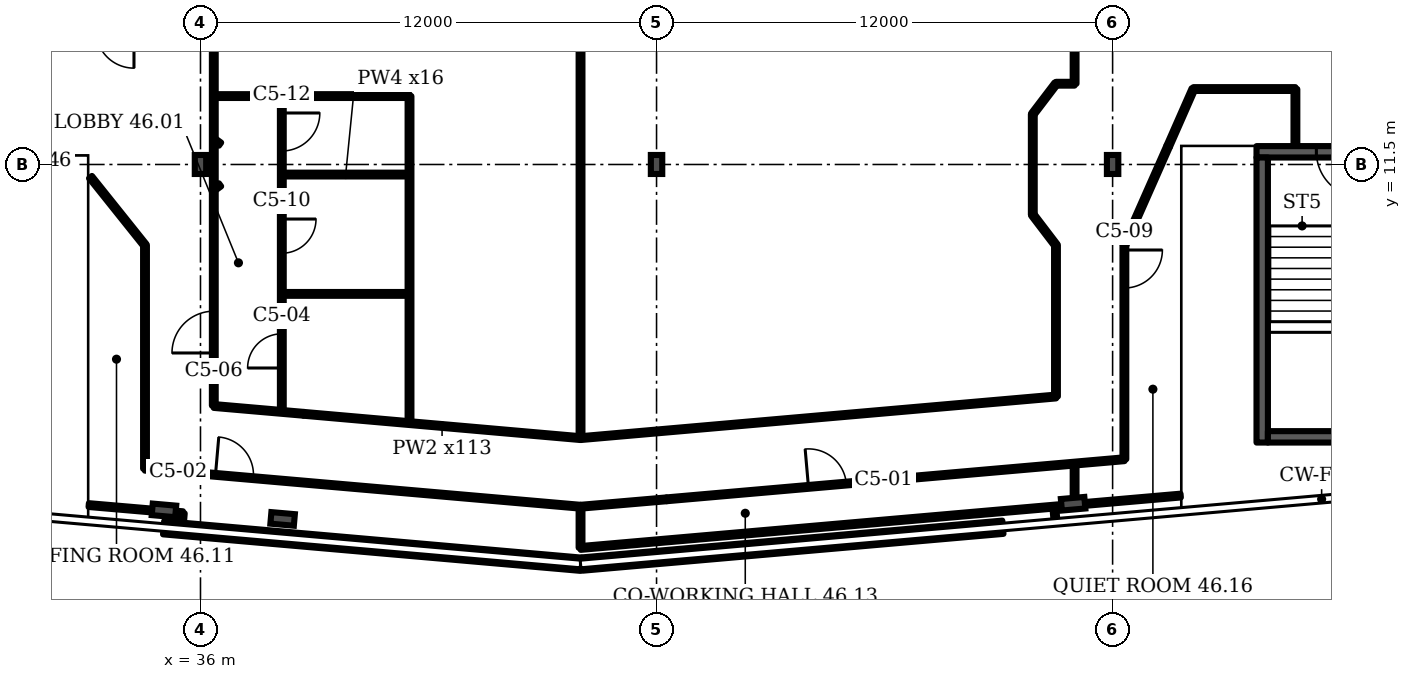
"""IFC4 building model, lengths in metres.
Left out: names, types, materials, properties, quantities, classifications, styles, units other than length and angle.
Written with IfcOpenShell. Run it as: python <this file> out.ifc"""

import sys

from ifc_helpers import new_model, si_unit, direction, frame, frame_2d, origin, origin_2d, place, context, subcontext, project, spatial, rectangle, i_section, extrude, element, fill, save


model = new_model("IFC4")
c1 = context("Model", 3, precision=1e-05, world=origin(), true_north=direction((0.0, 1.0)))
c2 = subcontext(c1, "Body", "Model", "MODEL_VIEW")
j1 = project(units=[si_unit("LENGTHUNIT", "METRE"), si_unit("PLANEANGLEUNIT", "RADIAN")], contexts=[c1])
p1 = place(None, origin())
s1 = spatial("IfcSite", under=j1, at=p1, CompositionType="ELEMENT")
p2 = place(p1, origin())
s2 = spatial("IfcBuilding", under=s1, at=p2, CompositionType="ELEMENT")
p3 = place(p2, frame((0.0, 0.0, 187.9)))
s3 = spatial("IfcBuildingStorey", under=s2, at=p3, CompositionType="ELEMENT", Elevation=187.9)
for number, where, z_axis, x_axis in (
    (1, (35.039, 2.399, 0.0), (0.0, 0.0, 1.0), (-0.087, -0.996, 0.0)),
    (2, (38.161, 2.174, 0.0), (0.0, 0.0, 1.0), (-0.087, -0.996, 0.0)),
    (3, (58.961, 2.573, 0.0), (0.0, 0.0, 1.0), (0.087, -0.996, 0.0)),
):
    element("IfcColumn", number, at=place(p3, frame(where, z_axis=z_axis, x_axis=x_axis)), inside=s3, PredefinedType="COLUMN", context=c2, shape_type="SweptSolid", body=[
        extrude(i_section(OverallWidth=0.305, OverallDepth=0.62, WebThickness=0.021, FlangeThickness=0.04, FilletRadius=0.027, at=origin_2d()), origin(), (0.0, 0.0, 1.0), 3.6),
    ])
for number, where, z_axis, x_axis in (
    (4, (36.0, 11.5, 0.0), (0.0, 0.0, 1.0), (1.0, 0.0, 0.0)),
    (5, (48.0, 11.5, 0.0), (0.0, 0.0, 1.0), (1.0, 0.0, 0.0)),
    (6, (60.0, 11.5, 0.0), (0.0, 0.0, 1.0), (1.0, 0.0, 0.0)),
):
    element("IfcColumn", number, at=place(p3, frame(where, z_axis=z_axis, x_axis=x_axis)), inside=s3, PredefinedType="COLUMN", context=c2, shape_type="SweptSolid", body=[
        extrude(i_section(OverallWidth=0.3, OverallDepth=0.5, WebThickness=0.014, FlangeThickness=0.028, FilletRadius=0.027, at=origin_2d()), origin(), (0.0, 0.0, 1.0), 3.6),
    ])
p4 = place(p3, frame((35.03, 1.943, 0.0), z_axis=(0.0, 0.0, 1.0), x_axis=(0.996199, -0.08714, 0.0)))
e7 = element("IfcWall", 7, at=p4, inside=s3, PredefinedType="SOLIDWALL", context=c2, shape_type="SweptSolid", body=[
    extrude(rectangle(XDim=11.028, YDim=0.35, at=frame_2d((5.514, 0.0))), origin(), (0.0, 0.0, 1.0), 1.0),
])
p5 = place(p3, frame((46.045, 0.987, 0.0), z_axis=(0.0, 0.0, 1.0), x_axis=(0.996193, 0.087171, 0.0)))
e8 = element("IfcWall", 8, at=p5, inside=s3, PredefinedType="SOLIDWALL", context=c2, shape_type="SweptSolid", body=[
    extrude(rectangle(XDim=11.11, YDim=0.35, at=frame_2d((5.555, 0.0))), origin(), (0.0, 0.0, 1.0), 1.0),
])
p6 = place(p3, frame((63.786, 11.834, 0.0), z_axis=(0.0, 0.0, 1.0), x_axis=(1.0, 0.0, 0.0)))
e9 = element("IfcWall", 9, at=p6, inside=s3, PredefinedType="SHEAR", context=c2, shape_type="SweptSolid", body=[
    extrude(rectangle(XDim=4.35, YDim=0.3, at=frame_2d((2.175, 0.0))), origin(), (0.0, 0.0, 1.0), 3.2),
])
p7 = place(p6, frame((1.575, 0.0, 0.0)))
e10 = element("IfcOpeningElement", 10, at=p7, cuts=e9, PredefinedType="OPENING", context=c2, shape_type="SweptSolid", body=[
    extrude(rectangle(XDim=1.2, YDim=2.1, at=frame_2d((0.6, 1.05))), frame((0.0, 0.16, 0.0), z_axis=(0.0, -1.0, 0.0), x_axis=(1.0, 0.0, 0.0)), (0.0, 0.0, 1.0), 0.32),
])
p8 = place(p3, frame((34.54, 3.495, 0.0), z_axis=(0.0, 0.0, 1.0), x_axis=(0.0, 1.0, 0.0)))
e11 = element("IfcWall", 11, at=p8, inside=s3, PredefinedType="PARTITIONING", context=c2, shape_type="SweptSolid", body=[
    extrude(rectangle(XDim=5.88, YDim=0.1, at=frame_2d((2.94, 0.0))), origin(), (0.0, 0.0, 1.0), 3.2),
])
p9 = place(p3, frame((34.54, 9.375, 0.0), z_axis=(0.0, 0.0, 1.0), x_axis=(-0.624735, 0.780839, 0.0)))
e12 = element("IfcWall", 12, at=p9, inside=s3, PredefinedType="PARTITIONING", context=c2, shape_type="SweptSolid", body=[
    extrude(rectangle(XDim=2.296, YDim=0.1, at=frame_2d((1.148, 0.0))), origin(), (0.0, 0.0, 1.0), 3.2),
])
p10 = place(p3, frame((35.502, 1.927, 0.0), z_axis=(0.0, 0.0, 1.0), x_axis=(0.083045, 0.996542, 0.0)))
e13 = element("IfcWall", 13, at=p10, inside=s3, PredefinedType="PARTITIONING", context=c2, shape_type="SweptSolid", body=[
    extrude(rectangle(XDim=0.4, YDim=0.1, at=frame_2d((0.2, 0.0))), origin(), (0.0, 0.0, 1.0), 3.2),
])
p11 = place(p3, frame((35.535, 2.325, 0.0), z_axis=(0.0, 0.0, 1.0), x_axis=(-0.996311, 0.085867, 0.0)))
e14 = element("IfcWall", 14, at=p11, inside=s3, PredefinedType="PARTITIONING", context=c2, shape_type="SweptSolid", body=[
    extrude(rectangle(XDim=2.485, YDim=0.1, at=frame_2d((1.243, 0.0))), origin(), (0.0, 0.0, 1.0), 2.58),
])
p12 = place(p3, frame((36.35, 5.155, 0.0), z_axis=(0.0, 0.0, 1.0), x_axis=(0.0, 1.0, 0.0)))
e15 = element("IfcWall", 15, at=p12, inside=s3, PredefinedType="PARTITIONING", context=c2, shape_type="SweptSolid", body=[
    extrude(rectangle(XDim=9.88, YDim=0.1, at=frame_2d((4.94, 0.0))), origin(), (0.0, 0.0, 1.0), 3.2),
])
p13 = place(p12, frame((1.385, 0.0, 0.0)))
e16 = element("IfcOpeningElement", 16, at=p13, cuts=e15, PredefinedType="OPENING", context=c2, shape_type="SweptSolid", body=[
    extrude(rectangle(XDim=1.1, YDim=2.1, at=frame_2d((0.55, 1.05))), frame((0.0, 0.06, 0.0), z_axis=(0.0, -1.0, 0.0), x_axis=(1.0, 0.0, 0.0)), (0.0, 0.0, 1.0), 0.12),
])
p14 = place(p3, frame((36.35, 10.845, 0.0), z_axis=(0.0, 0.0, 1.0), x_axis=(0.808115, 0.589026, 0.0)))
e17 = element("IfcWall", 17, at=p14, inside=s3, PredefinedType="PARTITIONING", context=c2, shape_type="SweptSolid", body=[
    extrude(rectangle(XDim=0.204, YDim=0.1, at=frame_2d((0.102, 0.0))), origin(), (0.0, 0.0, 1.0), 3.2),
])
p15 = place(p3, frame((36.35, 13.3, 0.0), z_axis=(0.0, 0.0, 1.0), x_axis=(1.0, 0.0, 0.0)))
e18 = element("IfcWall", 18, at=p15, inside=s3, PredefinedType="PARTITIONING", context=c2, shape_type="SweptSolid", body=[
    extrude(rectangle(XDim=5.15, YDim=0.1, at=frame_2d((2.575, 0.0))), origin(), (0.0, 0.0, 1.0), 3.2),
])
p16 = place(p3, frame((36.515, 12.035, 0.0), z_axis=(0.0, 0.0, 1.0), x_axis=(-0.808115, 0.589026, 0.0)))
e19 = element("IfcWall", 19, at=p16, inside=s3, PredefinedType="PARTITIONING", context=c2, shape_type="SweptSolid", body=[
    extrude(rectangle(XDim=0.204, YDim=0.1, at=frame_2d((0.102, 0.0))), origin(), (0.0, 0.0, 1.0), 3.2),
])
p17 = place(p3, frame((38.14, 5.0, 0.0), z_axis=(0.0, 0.0, 1.0), x_axis=(0.0, 1.0, 0.0)))
e20 = element("IfcWall", 20, at=p17, inside=s3, PredefinedType="PARTITIONING", context=c2, shape_type="SweptSolid", body=[
    extrude(rectangle(XDim=8.3, YDim=0.1, at=frame_2d((4.15, 0.0))), origin(), (0.0, 0.0, 1.0), 3.2),
])
p18 = place(p17, frame((1.145, 0.0, 0.0)))
e21 = element("IfcOpeningElement", 21, at=p18, cuts=e20, PredefinedType="OPENING", context=c2, shape_type="SweptSolid", body=[
    extrude(rectangle(XDim=0.9, YDim=2.1, at=frame_2d((0.45, 1.05))), frame((0.0, 0.06, 0.0), z_axis=(0.0, -1.0, 0.0), x_axis=(1.0, 0.0, 0.0)), (0.0, 0.0, 1.0), 0.12),
])
p19 = place(p17, frame((4.165, 0.0, 0.0)))
e22 = element("IfcOpeningElement", 22, at=p19, cuts=e20, PredefinedType="OPENING", context=c2, shape_type="SweptSolid", body=[
    extrude(rectangle(XDim=0.9, YDim=2.1, at=frame_2d((0.45, 1.05))), frame((0.0, 0.06, 0.0), z_axis=(0.0, -1.0, 0.0), x_axis=(1.0, 0.0, 0.0)), (0.0, 0.0, 1.0), 0.12),
])
p20 = place(p17, frame((6.855, 0.0, 0.0)))
e23 = element("IfcOpeningElement", 23, at=p20, cuts=e20, PredefinedType="OPENING", context=c2, shape_type="SweptSolid", body=[
    extrude(rectangle(XDim=1.0, YDim=2.1, at=frame_2d((0.5, 1.05))), frame((0.0, 0.06, 0.0), z_axis=(0.0, -1.0, 0.0), x_axis=(1.0, 0.0, 0.0)), (0.0, 0.0, 1.0), 0.12),
])
for number, where, z_axis, x_axis in (
    (24, (38.14, 8.095, 0.0), (0.0, 0.0, 1.0), (1.0, 0.0, 0.0)),
    (25, (38.14, 11.235, 0.0), (0.0, 0.0, 1.0), (1.0, 0.0, 0.0)),
):
    element("IfcWall", number, at=place(p3, frame(where, z_axis=z_axis, x_axis=x_axis)), inside=s3, PredefinedType="PARTITIONING", context=c2, shape_type="SweptSolid", body=[
        extrude(rectangle(XDim=3.36, YDim=0.1, at=frame_2d((1.68, 0.0))), origin(), (0.0, 0.0, 1.0), 3.2),
    ])
p21 = place(p3, frame((38.715, 4.94, 0.0), z_axis=(0.0, 0.0, 1.0), x_axis=(-0.996236, 0.086674, 0.0)))
e26 = element("IfcWall", 26, at=p21, inside=s3, PredefinedType="PARTITIONING", context=c2, shape_type="SweptSolid", body=[
    extrude(rectangle(XDim=2.372, YDim=0.1, at=frame_2d((1.186, 0.0))), origin(), (0.0, 0.0, 1.0), 3.2),
])
p22 = place(p3, frame((41.5, 4.695, 0.0), z_axis=(0.0, 0.0, 1.0), x_axis=(0.0, 1.0, 0.0)))
e27 = element("IfcWall", 27, at=p22, inside=s3, PredefinedType="PARTITIONING", context=c2, shape_type="SweptSolid", body=[
    extrude(rectangle(XDim=8.605, YDim=0.1, at=frame_2d((4.302, 0.0))), origin(), (0.0, 0.0, 1.0), 3.2),
])
p23 = place(p3, frame((46.0, 4.3, 0.0), z_axis=(0.0, 0.0, 1.0), x_axis=(-0.996173, 0.087448, 0.0)))
e28 = element("IfcWall", 28, at=p23, inside=s3, PredefinedType="PARTITIONING", context=c2, shape_type="SweptSolid", body=[
    extrude(rectangle(XDim=7.315, YDim=0.1, at=frame_2d((3.657, 0.0))), origin(), (0.0, 0.0, 1.0), 3.2),
])
p24 = place(p3, frame((46.0, 1.41, 0.0), z_axis=(0.0, 0.0, 1.0), x_axis=(0.996213, 0.086958, 0.0)))
e29 = element("IfcWall", 29, at=p24, inside=s3, PredefinedType="PARTITIONING", context=c2, shape_type="SweptSolid", body=[
    extrude(rectangle(XDim=15.852, YDim=0.1, at=frame_2d((7.926, 0.0))), origin(), (0.0, 0.0, 1.0), 2.58),
])
p25 = place(p3, frame((46.0, 1.415, 0.0), z_axis=(0.0, 0.0, 1.0), x_axis=(0.0, 1.0, 0.0)))
e30 = element("IfcWall", 30, at=p25, inside=s3, PredefinedType="PARTITIONING", context=c2, shape_type="SweptSolid", body=[
    extrude(rectangle(XDim=1.08, YDim=0.1, at=frame_2d((0.54, 0.0))), origin(), (0.0, 0.0, 1.0), 3.2),
])
p26 = place(p3, frame((46.0, 2.495, 0.0), z_axis=(0.0, 0.0, 1.0), x_axis=(-0.996214, 0.08693, 0.0)))
e31 = element("IfcWall", 31, at=p26, inside=s3, PredefinedType="PARTITIONING", context=c2, shape_type="SweptSolid", body=[
    extrude(rectangle(XDim=11.503, YDim=0.1, at=frame_2d((5.752, 0.0))), origin(), (0.0, 0.0, 1.0), 3.2),
])
p27 = place(p26, frame((8.642, 0.0, 0.0)))
e32 = element("IfcOpeningElement", 32, at=p27, cuts=e31, PredefinedType="OPENING", context=c2, shape_type="SweptSolid", body=[
    extrude(rectangle(XDim=1.0, YDim=2.1, at=frame_2d((0.5, 1.05))), frame((0.0, 0.06, 0.0), z_axis=(0.0, -1.0, 0.0), x_axis=(1.0, 0.0, 0.0)), (0.0, 0.0, 1.0), 0.12),
])
p28 = place(p3, frame((46.0, 4.3, 0.0), z_axis=(0.0, 0.0, 1.0), x_axis=(0.0, 1.0, 0.0)))
e33 = element("IfcWall", 33, at=p28, inside=s3, PredefinedType="PARTITIONING", context=c2, shape_type="SweptSolid", body=[
    extrude(rectangle(XDim=22.9, YDim=0.1, at=frame_2d((11.45, 0.0))), origin(), (0.0, 0.0, 1.0), 3.2),
])
p29 = place(p3, frame((46.0, 2.495, 0.0), z_axis=(0.0, 0.0, 1.0), x_axis=(0.996324, 0.085703, 0.0)))
e34 = element("IfcWall", 34, at=p29, inside=s3, PredefinedType="PARTITIONING", context=c2, shape_type="SweptSolid", body=[
    extrude(rectangle(XDim=2.273, YDim=0.1, at=frame_2d((1.137, 0.0))), origin(), (0.0, 0.0, 1.0), 3.2),
])
p30 = place(p3, frame((46.0, 4.3, 0.0), z_axis=(0.0, 0.0, 1.0), x_axis=(0.996189, 0.087194, 0.0)))
e35 = element("IfcWall", 35, at=p30, inside=s3, PredefinedType="PARTITIONING", context=c2, shape_type="SweptSolid", body=[
    extrude(rectangle(XDim=12.558, YDim=0.1, at=frame_2d((6.279, 0.0))), origin(), (0.0, 0.0, 1.0), 3.2),
])
p31 = place(p3, frame((48.265, 2.69, 0.0), z_axis=(0.0, 0.0, 1.0), x_axis=(0.996187, 0.087229, 0.0)))
e36 = element("IfcWall", 36, at=p31, inside=s3, PredefinedType="PARTITIONING", context=c2, shape_type="SweptSolid", body=[
    extrude(rectangle(XDim=12.091, YDim=0.1, at=frame_2d((6.045, 0.0))), origin(), (0.0, 0.0, 1.0), 3.2),
])
p32 = place(p31, frame((3.747, 0.0, 0.0)))
e37 = element("IfcOpeningElement", 37, at=p32, cuts=e36, PredefinedType="OPENING", context=c2, shape_type="SweptSolid", body=[
    extrude(rectangle(XDim=1.0, YDim=2.1, at=frame_2d((0.5, 1.05))), frame((0.0, 0.06, 0.0), z_axis=(0.0, -1.0, 0.0), x_axis=(1.0, 0.0, 0.0)), (0.0, 0.0, 1.0), 0.12),
])
p33 = place(p3, frame((57.9, 10.175, 0.0), z_axis=(0.0, 0.0, 1.0), x_axis=(0.0, 1.0, 0.0)))
e38 = element("IfcWall", 38, at=p33, inside=s3, PredefinedType="PARTITIONING", context=c2, shape_type="SweptSolid", body=[
    extrude(rectangle(XDim=2.65, YDim=0.1, at=frame_2d((1.325, 0.0))), origin(), (0.0, 0.0, 1.0), 3.2),
])
p34 = place(p3, frame((57.9, 12.825, 0.0), z_axis=(0.0, 0.0, 1.0), x_axis=(0.60639, 0.795174, 0.0)))
e39 = element("IfcWall", 39, at=p34, inside=s3, PredefinedType="PARTITIONING", context=c2, shape_type="SweptSolid", body=[
    extrude(rectangle(XDim=1.006, YDim=0.1, at=frame_2d((0.503, 0.0))), origin(), (0.0, 0.0, 1.0), 3.2),
])
p35 = place(p3, frame((58.498, 2.102, 0.0), z_axis=(0.0, 0.0, 1.0), x_axis=(-0.083045, 0.996542, 0.0)))
e40 = element("IfcWall", 40, at=p35, inside=s3, PredefinedType="PARTITIONING", context=c2, shape_type="SweptSolid", body=[
    extrude(rectangle(XDim=0.4, YDim=0.1, at=frame_2d((0.2, 0.0))), origin(), (0.0, 0.0, 1.0), 3.2),
])
p36 = place(p3, frame((58.51, 9.375, 0.0), z_axis=(0.0, 0.0, 1.0), x_axis=(-0.60639, 0.795174, 0.0)))
e41 = element("IfcWall", 41, at=p36, inside=s3, PredefinedType="PARTITIONING", context=c2, shape_type="SweptSolid", body=[
    extrude(rectangle(XDim=1.006, YDim=0.1, at=frame_2d((0.503, 0.0))), origin(), (0.0, 0.0, 1.0), 3.2),
])
p37 = place(p3, frame((58.51, 5.395, 0.0), z_axis=(0.0, 0.0, 1.0), x_axis=(0.0, 1.0, 0.0)))
e42 = element("IfcWall", 42, at=p37, inside=s3, PredefinedType="PARTITIONING", context=c2, shape_type="SweptSolid", body=[
    extrude(rectangle(XDim=3.98, YDim=0.1, at=frame_2d((1.99, 0.0))), origin(), (0.0, 0.0, 1.0), 3.2),
])
p38 = place(p3, frame((58.51, 13.625, 0.0), z_axis=(0.0, 0.0, 1.0), x_axis=(1.0, 0.0, 0.0)))
e43 = element("IfcWall", 43, at=p38, inside=s3, PredefinedType="PARTITIONING", context=c2, shape_type="SweptSolid", body=[
    extrude(rectangle(XDim=0.49, YDim=0.1, at=frame_2d((0.245, 0.0))), origin(), (0.0, 0.0, 1.0), 3.2),
])
p39 = place(p3, frame((59.0, 2.545, 0.0), z_axis=(0.0, 0.0, 1.0), x_axis=(0.0, 1.0, 0.0)))
e44 = element("IfcWall", 44, at=p39, inside=s3, PredefinedType="PARTITIONING", context=c2, shape_type="SweptSolid", body=[
    extrude(rectangle(XDim=1.085, YDim=0.1, at=frame_2d((0.542, 0.0))), origin(), (0.0, 0.0, 1.0), 3.2),
])
p40 = place(p3, frame((59.0, 13.625, 0.0), z_axis=(0.0, 0.0, 1.0), x_axis=(0.0, 1.0, 0.0)))
e45 = element("IfcWall", 45, at=p40, inside=s3, PredefinedType="PARTITIONING", context=c2, shape_type="SweptSolid", body=[
    extrude(rectangle(XDim=13.575, YDim=0.1, at=frame_2d((6.788, 0.0))), origin(), (0.0, 0.0, 1.0), 3.2),
])
p41 = place(p3, frame((60.31, 3.745, 0.0), z_axis=(0.0, 0.0, 1.0), x_axis=(0.0, 1.0, 0.0)))
e46 = element("IfcWall", 46, at=p41, inside=s3, PredefinedType="PARTITIONING", context=c2, shape_type="SweptSolid", body=[
    extrude(rectangle(XDim=5.63, YDim=0.1, at=frame_2d((2.815, 0.0))), origin(), (0.0, 0.0, 1.0), 3.2),
])
p42 = place(p41, frame((4.505, 0.0, 0.0)))
e47 = element("IfcOpeningElement", 47, at=p42, cuts=e46, PredefinedType="OPENING", context=c2, shape_type="SweptSolid", body=[
    extrude(rectangle(XDim=1.0, YDim=2.1, at=frame_2d((0.5, 1.05))), frame((0.0, 0.06, 0.0), z_axis=(0.0, -1.0, 0.0), x_axis=(1.0, 0.0, 0.0)), (0.0, 0.0, 1.0), 0.12),
])
p43 = place(p3, frame((60.31, 9.375, 0.0), z_axis=(0.0, 0.0, 1.0), x_axis=(0.404668, 0.914459, 0.0)))
e48 = element("IfcWall", 48, at=p43, inside=s3, PredefinedType="PARTITIONING", context=c2, shape_type="SweptSolid", body=[
    extrude(rectangle(XDim=2.854, YDim=0.1, at=frame_2d((1.427, 0.0))), origin(), (0.0, 0.0, 1.0), 3.2),
])
p44 = place(p3, frame((61.465, 11.985, 0.0), z_axis=(0.0, 0.0, 1.0), x_axis=(0.402692, 0.915331, 0.0)))
e49 = element("IfcWall", 49, at=p44, inside=s3, PredefinedType="PARTITIONING", context=c2, shape_type="SweptSolid", body=[
    extrude(rectangle(XDim=1.639, YDim=0.1, at=frame_2d((0.819, 0.0))), origin(), (0.0, 0.0, 1.0), 3.2),
])
p45 = place(p3, frame((62.125, 13.485, 0.0), z_axis=(0.0, 0.0, 1.0), x_axis=(1.0, 0.0, 0.0)))
e50 = element("IfcWall", 50, at=p45, inside=s3, PredefinedType="PARTITIONING", context=c2, shape_type="SweptSolid", body=[
    extrude(rectangle(XDim=2.685, YDim=0.1, at=frame_2d((1.343, 0.0))), origin(), (0.0, 0.0, 1.0), 3.2),
])
p46 = place(p3, frame((64.81, 12.004, 0.0), z_axis=(0.0, 0.0, 1.0), x_axis=(0.0, 1.0, 0.0)))
e51 = element("IfcWall", 51, at=p46, inside=s3, PredefinedType="PARTITIONING", context=c2, shape_type="SweptSolid", body=[
    extrude(rectangle(XDim=1.481, YDim=0.1, at=frame_2d((0.741, 0.0))), origin(), (0.0, 0.0, 1.0), 3.2),
])
p47 = place(p3, frame((63.936, 4.184, 0.0), z_axis=(0.0, 0.0, 1.0), x_axis=(0.0, 1.0, 0.0)))
e52 = element("IfcWall", 52, at=p47, inside=s3, PredefinedType="SHEAR", context=c2, shape_type="SweptSolid", body=[
    extrude(rectangle(XDim=7.5, YDim=0.3, at=frame_2d((3.75, 0.0))), origin(), (0.0, 0.0, 1.0), 3.2),
])
p48 = place(p3, frame((64.086, 4.334, 0.0), z_axis=(0.0, 0.0, 1.0), x_axis=(1.0, 0.0, 0.0)))
e53 = element("IfcWall", 53, at=p48, inside=s3, PredefinedType="SHEAR", context=c2, shape_type="SweptSolid", body=[
    extrude(rectangle(XDim=3.75, YDim=0.3, at=frame_2d((1.875, 0.0))), origin(), (0.0, 0.0, 1.0), 3.2),
])
p49 = place(p7, origin())
e54 = element("IfcDoor", 54, at=p49, inside=s3, OperationType="SINGLE_SWING_RIGHT", PredefinedType="DOOR", context=c2, shape_type="SweptSolid", body=[
    extrude(rectangle(XDim=1.2, YDim=2.1, at=frame_2d((0.6, 1.05))), frame((0.0, 0.025, 0.0), z_axis=(0.0, -1.0, 0.0), x_axis=(1.0, 0.0, 0.0)), (0.0, 0.0, 1.0), 0.05),
])
fill(e10, e54)
p50 = place(p32, origin())
e55 = element("IfcDoor", 55, at=p50, inside=s3, OperationType="SINGLE_SWING_LEFT", PredefinedType="DOOR", context=c2, shape_type="SweptSolid", body=[
    extrude(rectangle(XDim=1.0, YDim=2.1, at=frame_2d((0.5, 1.05))), frame((0.0, 0.025, 0.0), z_axis=(0.0, -1.0, 0.0), x_axis=(1.0, 0.0, 0.0)), (0.0, 0.0, 1.0), 0.05),
])
fill(e37, e55)
p51 = place(p27, origin())
e56 = element("IfcDoor", 56, at=p51, inside=s3, OperationType="SINGLE_SWING_RIGHT", PredefinedType="DOOR", context=c2, shape_type="SweptSolid", body=[
    extrude(rectangle(XDim=1.0, YDim=2.1, at=frame_2d((0.5, 1.05))), frame((0.0, 0.025, 0.0), z_axis=(0.0, -1.0, 0.0), x_axis=(1.0, 0.0, 0.0)), (0.0, 0.0, 1.0), 0.05),
])
fill(e32, e56)
p52 = place(p18, origin())
e57 = element("IfcDoor", 57, at=p52, inside=s3, OperationType="SINGLE_SWING_LEFT", PredefinedType="DOOR", context=c2, shape_type="SweptSolid", body=[
    extrude(rectangle(XDim=0.9, YDim=2.1, at=frame_2d((0.45, 1.05))), frame((0.0, 0.025, 0.0), z_axis=(0.0, -1.0, 0.0), x_axis=(1.0, 0.0, 0.0)), (0.0, 0.0, 1.0), 0.05),
])
fill(e21, e57)
p53 = place(p13, origin())
e58 = element("IfcDoor", 58, at=p53, inside=s3, OperationType="SINGLE_SWING_LEFT", PredefinedType="DOOR", context=c2, shape_type="SweptSolid", body=[
    extrude(rectangle(XDim=1.1, YDim=2.1, at=frame_2d((0.55, 1.05))), frame((0.0, 0.025, 0.0), z_axis=(0.0, -1.0, 0.0), x_axis=(1.0, 0.0, 0.0)), (0.0, 0.0, 1.0), 0.05),
])
fill(e16, e58)
p54 = place(p42, origin())
e59 = element("IfcDoor", 59, at=p54, inside=s3, OperationType="SINGLE_SWING_RIGHT", PredefinedType="DOOR", context=c2, shape_type="SweptSolid", body=[
    extrude(rectangle(XDim=1.0, YDim=2.1, at=frame_2d((0.5, 1.05))), frame((0.0, 0.025, 0.0), z_axis=(0.0, -1.0, 0.0), x_axis=(1.0, 0.0, 0.0)), (0.0, 0.0, 1.0), 0.05),
])
fill(e47, e59)
p55 = place(p19, origin())
e60 = element("IfcDoor", 60, at=p55, inside=s3, OperationType="SINGLE_SWING_RIGHT", PredefinedType="DOOR", context=c2, shape_type="SweptSolid", body=[
    extrude(rectangle(XDim=0.9, YDim=2.1, at=frame_2d((0.45, 1.05))), frame((0.0, 0.025, 0.0), z_axis=(0.0, -1.0, 0.0), x_axis=(1.0, 0.0, 0.0)), (0.0, 0.0, 1.0), 0.05),
])
fill(e22, e60)
p56 = place(p20, origin())
e61 = element("IfcDoor", 61, at=p56, inside=s3, OperationType="SINGLE_SWING_RIGHT", PredefinedType="DOOR", context=c2, shape_type="SweptSolid", body=[
    extrude(rectangle(XDim=1.0, YDim=2.1, at=frame_2d((0.5, 1.05))), frame((0.0, 0.025, 0.0), z_axis=(0.0, -1.0, 0.0), x_axis=(1.0, 0.0, 0.0)), (0.0, 0.0, 1.0), 0.05),
])
fill(e23, e61)
save(model, sys.argv[1])
